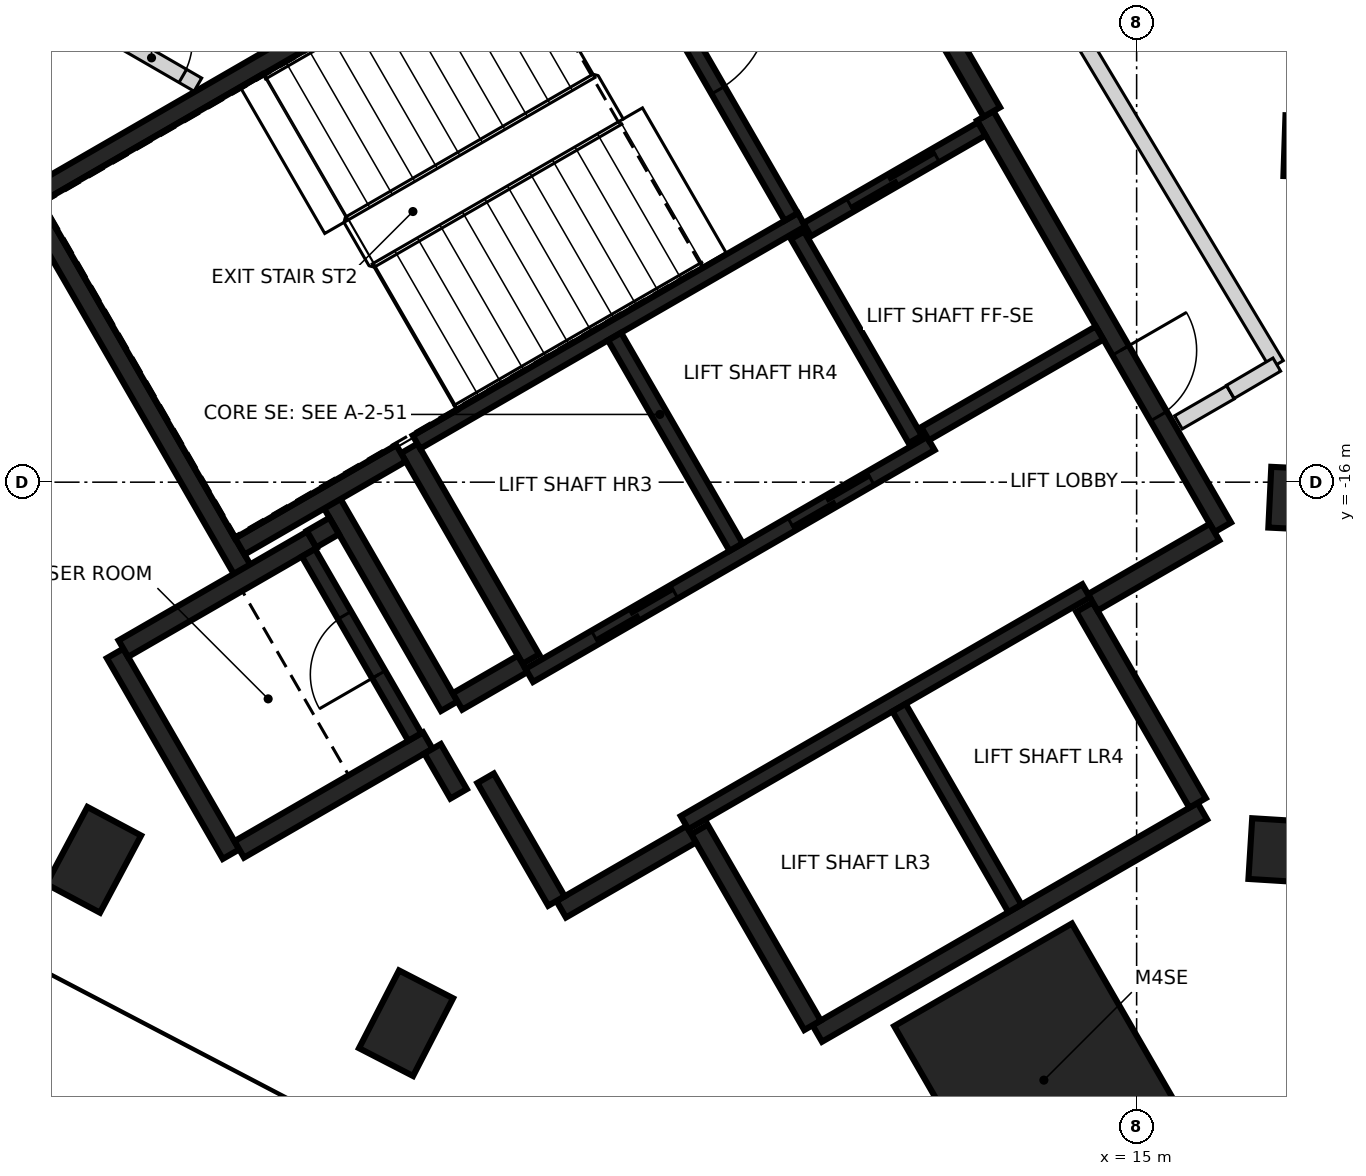
"""IFC4 building model, lengths in metres.
Left out: names, types, materials, properties, quantities, classifications, styles, units other than length and angle.
Written with IfcOpenShell. Run it as: python <this file> out.ifc"""

import sys

from ifc_helpers import new_model, si_unit, direction, frame, frame_2d, origin, origin_2d, place, context, subcontext, project, spatial, rectangle, extrude, element, fill, save


model = new_model("IFC4")
c1 = context("Model", 3, precision=1e-05, world=origin(), true_north=direction((0.0, 1.0)))
c2 = subcontext(c1, "Body", "Model", "MODEL_VIEW")
j1 = project(units=[si_unit("LENGTHUNIT", "METRE"), si_unit("PLANEANGLEUNIT", "RADIAN")], contexts=[c1])
p1 = place(None, origin())
s1 = spatial("IfcSite", under=j1, at=p1, CompositionType="ELEMENT")
p2 = place(p1, origin())
s2 = spatial("IfcBuilding", under=s1, at=p2, CompositionType="ELEMENT")
p3 = place(p2, frame((0.0, 0.0, 175.6)))
s3 = spatial("IfcBuildingStorey", under=s2, at=p3, CompositionType="ELEMENT", Elevation=175.6)
for number, where, z_axis, x_axis in (
    (1, (17.07, -20.856, -0.35), (0.0, 0.0, 1.0), (-0.998, 0.062, 0.0)),
    (2, (17.326, -16.226, -0.35), (0.0, 0.0, 1.0), (-0.999, 0.048, 0.0)),
    (3, (17.519, -11.592, -0.35), (0.0, 0.0, 1.0), (-0.999, 0.034, 0.0)),
    (4, (1.279, -20.968, -0.35), (0.0, 0.0, 1.0), (0.47, 0.883, 0.0)),
    (5, (5.388, -23.118, -0.35), (0.0, 0.0, 1.0), (0.458, 0.889, 0.0)),
):
    element("IfcColumn", number, at=place(p3, frame(where, z_axis=z_axis, x_axis=x_axis)), inside=s3, PredefinedType="COLUMN", context=c2, shape_type="SweptSolid", body=[
        extrude(rectangle(XDim=1.15, YDim=0.8, at=origin_2d()), origin(), (0.0, 0.0, 1.0), 3.6),
    ])
p4 = place(p3, frame((13.78, -23.867, -0.35), z_axis=(0.0, 0.0, 1.0), x_axis=(-0.5, 0.866025403784, 0.0)))
e6 = element("IfcColumn", 6, at=p4, inside=s3, PredefinedType="COLUMN", context=c2, shape_type="SweptSolid", body=[
    extrude(rectangle(XDim=3.2, YDim=2.7, at=origin_2d()), origin(), (0.0, 0.0, 1.0), 3.6),
])
p5 = place(p3, frame((0.417, -12.273, 0.0), z_axis=(0.0, 0.0, 1.0), x_axis=(0.866021906294, 0.500006057782, 0.0)))
e7 = element("IfcWall", 7, at=p5, inside=s3, PredefinedType="SHEAR", context=c2, shape_type="SweptSolid", body=[
    extrude(rectangle(XDim=11.55, YDim=0.25, at=frame_2d((5.775, 0.0))), origin(), (0.0, 0.0, 1.0), 3.25),
])
p6 = place(p5, frame((10.025, 0.0, 0.0)))
e8 = element("IfcOpeningElement", 8, at=p6, cuts=e7, PredefinedType="OPENING", context=c2, shape_type="SweptSolid", body=[
    extrude(rectangle(XDim=1.2, YDim=2.1, at=frame_2d((0.6, 1.05))), frame((0.0, 0.135, 0.0), z_axis=(0.0, -1.0, 0.0), x_axis=(1.0, 0.0, 0.0)), (0.0, 0.0, 1.0), 0.27),
])
p7 = place(p5, frame((8.725, 0.0, 0.0)))
e9 = element("IfcOpeningElement", 9, at=p7, cuts=e7, PredefinedType="OPENING", context=c2, shape_type="SweptSolid", body=[
    extrude(rectangle(XDim=1.2, YDim=2.1, at=frame_2d((0.6, 1.05))), frame((0.0, 0.135, 0.0), z_axis=(0.0, -1.0, 0.0), x_axis=(1.0, 0.0, 0.0)), (0.0, 0.0, 1.0), 0.27),
])
p8 = place(p3, frame((13.008, -11.181, 0.0), z_axis=(0.0, 0.0, 1.0), x_axis=(0.500004234368, -0.866022959057, 0.0)))
e10 = element("IfcWall", 10, at=p8, inside=s3, PredefinedType="SHEAR", context=c2, shape_type="SweptSolid", body=[
    extrude(rectangle(XDim=6.25, YDim=0.25, at=frame_2d((3.125, 0.0))), origin(), (0.0, 0.0, 1.0), 3.25),
])
p9 = place(p8, frame((3.563, 0.0, 0.0)))
e11 = element("IfcOpeningElement", 11, at=p9, cuts=e10, PredefinedType="OPENING", context=c2, shape_type="SweptSolid", body=[
    extrude(rectangle(XDim=1.0, YDim=2.1, at=frame_2d((0.5, 1.05))), frame((0.0, 0.135, 0.0), z_axis=(0.0, -1.0, 0.0), x_axis=(1.0, 0.0, 0.0)), (0.0, 0.0, 1.0), 0.27),
])
p10 = place(p3, frame((15.865, -20.328, 0.0), z_axis=(0.0, 0.0, 1.0), x_axis=(-0.86602852612, -0.499994591916, 0.0)))
e12 = element("IfcWall", 12, at=p10, inside=s3, PredefinedType="SHEAR", context=c2, shape_type="SweptSolid", body=[
    extrude(rectangle(XDim=5.85, YDim=0.25, at=frame_2d((2.925, 0.0))), origin(), (0.0, 0.0, 1.0), 3.25),
])
p11 = place(p3, frame((3.235, -17.153, 0.0), z_axis=(0.0, 0.0, 1.0), x_axis=(-0.500008851346, 0.866020293397, 0.0)))
e13 = element("IfcWall", 13, at=p11, inside=s3, PredefinedType="SHEAR", context=c2, shape_type="SweptSolid", body=[
    extrude(rectangle(XDim=5.51, YDim=0.25, at=frame_2d((2.755, 0.0))), origin(), (0.0, 0.0, 1.0), 3.25),
])
p12 = place(p3, frame((10.483, -6.606, 0.0), z_axis=(0.0, 0.0, 1.0), x_axis=(0.49999885962, -0.866026062182, 0.0)))
e14 = element("IfcWall", 14, at=p12, inside=s3, PredefinedType="SHEAR", context=c2, shape_type="SweptSolid", body=[
    extrude(rectangle(XDim=5.225, YDim=0.25, at=frame_2d((2.612, 0.0))), origin(), (0.0, 0.0, 1.0), 3.25),
])
p13 = place(p3, frame((7.031, -18.327, 0.0), z_axis=(0.0, 0.0, 1.0), x_axis=(-0.499971222258, 0.866042017984, 0.0)))
e15 = element("IfcWall", 15, at=p13, inside=s3, PredefinedType="SHEAR", context=c2, shape_type="SweptSolid", body=[
    extrude(rectangle(XDim=3.2, YDim=0.25, at=frame_2d((1.6, 0.0))), origin(), (0.0, 0.0, 1.0), 3.25),
])
for number, where, z_axis, x_axis in (
    (16, (14.315, -17.644, 0.0), (0.0, 0.0, 1.0), (0.5, -0.866, 0.0)),
    (17, (10.736, -23.145, 0.0), (0.0, 0.0, 1.0), (-0.5, 0.866, 0.0)),
):
    element("IfcWall", number, at=place(p3, frame(where, z_axis=z_axis, x_axis=x_axis)), inside=s3, PredefinedType="SHEAR", context=c2, shape_type="SweptSolid", body=[
        extrude(rectangle(XDim=2.974, YDim=0.25, at=frame_2d((1.487, 0.0))), origin(), (0.0, 0.0, 1.0), 3.25),
    ])
p14 = place(p3, frame((3.085, -20.894, 0.0), z_axis=(0.0, 0.0, 1.0), x_axis=(-0.499978833458, 0.866037623948, 0.0)))
e18 = element("IfcWall", 18, at=p14, inside=s3, PredefinedType="SHEAR", context=c2, shape_type="SweptSolid", body=[
    extrude(rectangle(XDim=3.05, YDim=0.25, at=frame_2d((1.525, 0.0))), origin(), (0.0, 0.0, 1.0), 3.25),
])
p15 = place(p3, frame((1.669, -18.19, 0.0), z_axis=(0.0, 0.0, 1.0), x_axis=(0.866042235819, 0.499970844928, 0.0)))
e19 = element("IfcWall", 19, at=p15, inside=s3, PredefinedType="SHEAR", context=c2, shape_type="SweptSolid", body=[
    extrude(rectangle(XDim=2.865, YDim=0.25, at=frame_2d((1.432, 0.0))), origin(), (0.0, 0.0, 1.0), 3.25),
])
p16 = place(p3, frame((5.675, -19.399, 0.0), z_axis=(0.0, 0.0, 1.0), x_axis=(-0.866026637627, -0.499997862916, 0.0)))
e20 = element("IfcWall", 20, at=p16, inside=s3, PredefinedType="SHEAR", context=c2, shape_type="SweptSolid", body=[
    extrude(rectangle(XDim=2.865, YDim=0.25, at=frame_2d((1.432, 0.0))), origin(), (0.0, 0.0, 1.0), 3.25),
])
p17 = place(p3, frame((4.414, -16.276, 0.0), z_axis=(0.0, 0.0, 1.0), x_axis=(0.500003324108, -0.866023484601, 0.0)))
e21 = element("IfcWall", 21, at=p17, inside=s3, PredefinedType="SHEAR", context=c2, shape_type="SweptSolid", body=[
    extrude(rectangle(XDim=3.085, YDim=0.25, at=frame_2d((1.542, 0.0))), origin(), (0.0, 0.0, 1.0), 3.25),
])
p18 = place(p3, frame((5.322, -15.619, 0.0), z_axis=(0.0, 0.0, 1.0), x_axis=(-0.866026229868, -0.499998569178, 0.0)))
e22 = element("IfcWall", 22, at=p18, inside=s3, PredefinedType="SHEAR", context=c2, shape_type="SweptSolid", body=[
    extrude(rectangle(XDim=2.449, YDim=0.25, at=frame_2d((1.225, 0.0))), origin(), (0.0, 0.0, 1.0), 3.25),
])
p19 = place(p3, frame((9.14, -20.631, 0.0), z_axis=(0.0, 0.0, 1.0), x_axis=(-0.866043531843, -0.499968599967, 0.0)))
e23 = element("IfcWall", 23, at=p19, inside=s3, PredefinedType="SHEAR", context=c2, shape_type="SweptSolid", body=[
    extrude(rectangle(XDim=1.975, YDim=0.25, at=frame_2d((0.987, 0.0))), origin(), (0.0, 0.0, 1.0), 3.25),
])
p20 = place(p3, frame((16.025, -16.656, 0.0), z_axis=(0.0, 0.0, 1.0), x_axis=(-0.866016279763, -0.500015802937, 0.0)))
e24 = element("IfcWall", 24, at=p20, inside=s3, PredefinedType="SHEAR", context=c2, shape_type="SweptSolid", body=[
    extrude(rectangle(XDim=1.849, YDim=0.25, at=frame_2d((0.925, 0.0))), origin(), (0.0, 0.0, 1.0), 3.25),
])
p21 = place(p3, frame((7.367, -21.51, 0.0), z_axis=(0.0, 0.0, 1.0), x_axis=(-0.499983108224, 0.866035156036, 0.0)))
e25 = element("IfcWall", 25, at=p21, inside=s3, PredefinedType="SHEAR", context=c2, shape_type="SweptSolid", body=[
    extrude(rectangle(XDim=1.865, YDim=0.25, at=frame_2d((0.932, 0.0))), origin(), (0.0, 0.0, 1.0), 3.25),
])
p22 = place(p3, frame((6.065, -18.885, 0.0), z_axis=(0.0, 0.0, 1.0), x_axis=(0.866017078145, 0.500014420154, 0.0)))
e26 = element("IfcWall", 26, at=p22, inside=s3, PredefinedType="SHEAR", context=c2, shape_type="SweptSolid", body=[
    extrude(rectangle(XDim=0.989, YDim=0.25, at=frame_2d((0.495, 0.0))), origin(), (0.0, 0.0, 1.0), 3.25),
])
p23 = place(p3, frame((6.08, -20.1, 0.0), z_axis=(0.0, 0.0, 1.0), x_axis=(-0.500051773299, 0.865995510393, 0.0)))
e27 = element("IfcWall", 27, at=p23, inside=s3, PredefinedType="SHEAR", context=c2, shape_type="SweptSolid", body=[
    extrude(rectangle(XDim=0.685, YDim=0.25, at=frame_2d((0.342, 0.0))), origin(), (0.0, 0.0, 1.0), 3.25),
])
p24 = place(p3, frame((4.145, -16.749, 0.0), z_axis=(0.0, 0.0, 1.0), x_axis=(0.866185586049, 0.49972245349, 0.0)))
e28 = element("IfcWall", 28, at=p24, inside=s3, PredefinedType="SHEAR", context=c2, shape_type="SweptSolid", body=[
    extrude(rectangle(XDim=0.344, YDim=0.25, at=frame_2d((0.172, 0.0))), origin(), (0.0, 0.0, 1.0), 3.25),
])
p25 = place(p3, frame((9.052, -20.48, 0.0), z_axis=(0.0, 0.0, 1.0), x_axis=(0.866030299012, 0.499991521122, 0.0)))
e29 = element("IfcWall", 29, at=p25, inside=s3, PredefinedType="SHEAR", context=c2, shape_type="SweptSolid", body=[
    extrude(rectangle(XDim=6.1, YDim=0.2, at=frame_2d((3.05, 0.0))), origin(), (0.0, 0.0, 1.0), 3.25),
])
p26 = place(p3, frame((5.526, -15.472, 0.0), z_axis=(0.0, 0.0, 1.0), x_axis=(0.866041752167, 0.499971682701, 0.0)))
e30 = element("IfcWall", 30, at=p26, inside=s3, PredefinedType="SHEAR", context=c2, shape_type="SweptSolid", body=[
    extrude(rectangle(XDim=5.851, YDim=0.2, at=frame_2d((2.925, 0.0))), origin(), (0.0, 0.0, 1.0), 3.25),
])
p27 = place(p3, frame((12.293, -15.491, 0.0), z_axis=(0.0, 0.0, 1.0), x_axis=(-0.866030299012, -0.499991521122, 0.0)))
e31 = element("IfcWall", 31, at=p27, inside=s3, PredefinedType="SHEAR", context=c2, shape_type="SweptSolid", body=[
    extrude(rectangle(XDim=6.1, YDim=0.2, at=frame_2d((3.05, 0.0))), origin(), (0.0, 0.0, 1.0), 3.25),
])
p28 = place(p27, frame((3.9, 0.0, 0.0)))
e32 = element("IfcOpeningElement", 32, at=p28, cuts=e31, PredefinedType="OPENING", context=c2, shape_type="SweptSolid", body=[
    extrude(rectangle(XDim=1.2, YDim=2.1, at=frame_2d((0.6, 1.05))), frame((0.0, 0.11, 0.0), z_axis=(0.0, -1.0, 0.0), x_axis=(1.0, 0.0, 0.0)), (0.0, 0.0, 1.0), 0.22),
])
p29 = place(p27, frame((0.918, 0.0, 0.0)))
e33 = element("IfcOpeningElement", 33, at=p29, cuts=e31, PredefinedType="OPENING", context=c2, shape_type="SweptSolid", body=[
    extrude(rectangle(XDim=1.2, YDim=2.1, at=frame_2d((0.6, 1.05))), frame((0.0, 0.11, 0.0), z_axis=(0.0, -1.0, 0.0), x_axis=(1.0, 0.0, 0.0)), (0.0, 0.0, 1.0), 0.22),
])
p30 = place(p3, frame((7.906, -8.094, 0.0), z_axis=(0.0, 0.0, 1.0), x_axis=(0.500027839223, -0.866009330205, 0.0)))
e34 = element("IfcWall", 34, at=p30, inside=s3, PredefinedType="SHEAR", context=c2, shape_type="SweptSolid", body=[
    extrude(rectangle(XDim=5.098, YDim=0.2, at=frame_2d((2.549, 0.0))), origin(), (0.0, 0.0, 1.0), 3.25),
])
p31 = place(p30, frame((1.774, 0.0, 0.0)))
e35 = element("IfcOpeningElement", 35, at=p31, cuts=e34, PredefinedType="OPENING", context=c2, shape_type="SweptSolid", body=[
    extrude(rectangle(XDim=1.4, YDim=2.1, at=frame_2d((0.7, 1.05))), frame((0.0, 0.11, 0.0), z_axis=(0.0, -1.0, 0.0), x_axis=(1.0, 0.0, 0.0)), (0.0, 0.0, 1.0), 0.22),
])
p32 = place(p3, frame((8.132, -14.084, 0.0), z_axis=(0.0, 0.0, 1.0), x_axis=(0.499997778408, -0.866026686418, 0.0)))
e36 = element("IfcWall", 36, at=p32, inside=s3, PredefinedType="SHEAR", context=c2, shape_type="SweptSolid", body=[
    extrude(rectangle(XDim=3.198, YDim=0.2, at=frame_2d((1.599, 0.0))), origin(), (0.0, 0.0, 1.0), 3.25),
])
p33 = place(p3, frame((11.875, -18.967, 0.0), z_axis=(0.0, 0.0, 1.0), x_axis=(0.49998131003, -0.866036194175, 0.0)))
e37 = element("IfcWall", 37, at=p33, inside=s3, PredefinedType="SHEAR", context=c2, shape_type="SweptSolid", body=[
    extrude(rectangle(XDim=3.048, YDim=0.2, at=frame_2d((1.524, 0.0))), origin(), (0.0, 0.0, 1.0), 3.25),
])
p34 = place(p3, frame((5.503, -19.352, 0.0), z_axis=(0.0, 0.0, 1.0), x_axis=(-0.499986818241, 0.866033014143, 0.0)))
e38 = element("IfcWall", 38, at=p34, inside=s3, PredefinedType="SHEAR", context=c2, shape_type="SweptSolid", body=[
    extrude(rectangle(XDim=2.798, YDim=0.2, at=frame_2d((1.399, 0.0))), origin(), (0.0, 0.0, 1.0), 3.25),
])
p35 = place(p34, frame((0.949, 0.0, 0.0)))
e39 = element("IfcOpeningElement", 39, at=p35, cuts=e38, PredefinedType="OPENING", context=c2, shape_type="SweptSolid", body=[
    extrude(rectangle(XDim=0.9, YDim=2.1, at=frame_2d((0.45, 1.05))), frame((0.0, 0.11, 0.0), z_axis=(0.0, -1.0, 0.0), x_axis=(1.0, 0.0, 0.0)), (0.0, 0.0, 1.0), 0.22),
])
p36 = place(p3, frame((12.088, -15.437, 0.0), z_axis=(0.0, 0.0, 1.0), x_axis=(-0.500026960575, 0.86600983753, 0.0)))
e40 = element("IfcWall", 40, at=p36, inside=s3, PredefinedType="SHEAR", context=c2, shape_type="SweptSolid", body=[
    extrude(rectangle(XDim=3.1, YDim=0.2, at=frame_2d((1.55, 0.0))), origin(), (0.0, 0.0, 1.0), 3.25),
])
p37 = place(p3, frame((10.666, -12.678, 0.0), z_axis=(0.0, 0.0, 1.0), x_axis=(0.866018407898, 0.500012117035, 0.0)))
e41 = element("IfcWall", 41, at=p37, inside=s3, PredefinedType="SHEAR", context=c2, shape_type="SweptSolid", body=[
    extrude(rectangle(XDim=2.651, YDim=0.2, at=frame_2d((1.325, 0.0))), origin(), (0.0, 0.0, 1.0), 3.25),
])
p38 = place(p37, frame((0.652, 0.0, 0.0)))
e42 = element("IfcOpeningElement", 42, at=p38, cuts=e41, PredefinedType="OPENING", context=c2, shape_type="SweptSolid", body=[
    extrude(rectangle(XDim=1.3, YDim=2.1, at=frame_2d((0.65, 1.05))), frame((0.0, 0.11, 0.0), z_axis=(0.0, -1.0, 0.0), x_axis=(1.0, 0.0, 0.0)), (0.0, 0.0, 1.0), 0.22),
])
p39 = place(p3, frame((14.512, -14.037, 0.0), z_axis=(0.0, 0.0, 1.0), x_axis=(-0.866018407898, -0.500012117035, 0.0)))
e43 = element("IfcWall", 43, at=p39, inside=s3, PredefinedType="SHEAR", context=c2, shape_type="SweptSolid", body=[
    extrude(rectangle(XDim=2.651, YDim=0.2, at=frame_2d((1.325, 0.0))), origin(), (0.0, 0.0, 1.0), 3.25),
])
p40 = place(p3, frame((-8.33, -4.428, 0.0), z_axis=(0.0, 0.0, 1.0), x_axis=(0.865923263811, -0.500176869909, 0.0)))
e44 = element("IfcWall", 44, at=p40, inside=s3, PredefinedType="PARTITIONING", context=c2, shape_type="SweptSolid", body=[
    extrude(rectangle(XDim=12.68, YDim=0.2, at=frame_2d((6.34, 0.0))), origin(), (0.0, 0.0, 1.0), 3.25),
])
p41 = place(p40, frame((2.87, 0.0, 0.0)))
e45 = element("IfcOpeningElement", 45, at=p41, cuts=e44, PredefinedType="OPENING", context=c2, shape_type="SweptSolid", body=[
    extrude(rectangle(XDim=0.95, YDim=2.1, at=frame_2d((0.475, 1.05))), frame((0.0, 0.11, 0.0), z_axis=(0.0, -1.0, 0.0), x_axis=(1.0, 0.0, 0.0)), (0.0, 0.0, 1.0), 0.22),
])
p42 = place(p40, frame((11.5, 0.0, 0.0)))
e46 = element("IfcOpeningElement", 46, at=p42, cuts=e44, PredefinedType="OPENING", context=c2, shape_type="SweptSolid", body=[
    extrude(rectangle(XDim=0.95, YDim=2.1, at=frame_2d((0.475, 1.05))), frame((0.0, 0.11, 0.0), z_axis=(0.0, -1.0, 0.0), x_axis=(1.0, 0.0, 0.0)), (0.0, 0.0, 1.0), 0.22),
])
p43 = place(p3, frame((11.216, -5.058, 0.0), z_axis=(0.0, 0.0, 1.0), x_axis=(0.51393500197, -0.857829128527, 0.0)))
e47 = element("IfcWall", 47, at=p43, inside=s3, PredefinedType="PARTITIONING", context=c2, shape_type="SweptSolid", body=[
    extrude(rectangle(XDim=10.951, YDim=0.2, at=frame_2d((5.475, 0.0))), origin(), (0.0, 0.0, 1.0), 3.25),
])
p44 = place(p43, frame((4.438, 0.0, 0.0)))
e48 = element("IfcOpeningElement", 48, at=p44, cuts=e47, PredefinedType="OPENING", context=c2, shape_type="SweptSolid", body=[
    extrude(rectangle(XDim=0.95, YDim=2.1, at=frame_2d((0.475, 1.05))), frame((0.0, 0.11, 0.0), z_axis=(0.0, -1.0, 0.0), x_axis=(1.0, 0.0, 0.0)), (0.0, 0.0, 1.0), 0.22),
])
p45 = place(p3, frame((15.55, -15.213, 0.0), z_axis=(0.0, 0.0, 1.0), x_axis=(0.865989998118, 0.500061319399, 0.0)))
e49 = element("IfcWall", 49, at=p45, inside=s3, PredefinedType="PARTITIONING", context=c2, shape_type="SweptSolid", body=[
    extrude(rectangle(XDim=0.79, YDim=0.2, at=frame_2d((0.395, 0.0))), origin(), (0.0, 0.0, 1.0), 3.25),
])
p46 = place(p3, frame((16.233, -14.812, 0.0), z_axis=(0.0, 0.0, 1.0), x_axis=(0.862137800155, 0.506673872964, 0.0)))
e50 = element("IfcWall", 50, at=p46, inside=s3, PredefinedType="PARTITIONING", context=c2, shape_type="SweptSolid", body=[
    extrude(rectangle(XDim=0.709, YDim=0.2, at=frame_2d((0.354, 0.0))), origin(), (0.0, 0.0, 1.0), 3.25),
])
p47 = place(p38, origin())
e51 = element("IfcDoor", 51, at=p47, inside=s3, OperationType="SLIDING_TO_LEFT", PredefinedType="DOOR", context=c2, shape_type="SweptSolid", body=[
    extrude(rectangle(XDim=1.3, YDim=2.1, at=frame_2d((0.65, 1.05))), frame((0.0, 0.025, 0.0), z_axis=(0.0, -1.0, 0.0), x_axis=(1.0, 0.0, 0.0)), (0.0, 0.0, 1.0), 0.05),
])
fill(e42, e51)
p48 = place(p28, origin())
e52 = element("IfcDoor", 52, at=p48, inside=s3, OperationType="DOUBLE_DOOR_SLIDING", PredefinedType="DOOR", context=c2, shape_type="SweptSolid", body=[
    extrude(rectangle(XDim=1.2, YDim=2.1, at=frame_2d((0.6, 1.05))), frame((0.0, 0.025, 0.0), z_axis=(0.0, -1.0, 0.0), x_axis=(1.0, 0.0, 0.0)), (0.0, 0.0, 1.0), 0.05),
])
fill(e32, e52)
p49 = place(p29, origin())
e53 = element("IfcDoor", 53, at=p49, inside=s3, OperationType="DOUBLE_DOOR_SLIDING", PredefinedType="DOOR", context=c2, shape_type="SweptSolid", body=[
    extrude(rectangle(XDim=1.2, YDim=2.1, at=frame_2d((0.6, 1.05))), frame((0.0, 0.025, 0.0), z_axis=(0.0, -1.0, 0.0), x_axis=(1.0, 0.0, 0.0)), (0.0, 0.0, 1.0), 0.05),
])
fill(e33, e53)
p50 = place(p9, origin())
e54 = element("IfcDoor", 54, at=p50, inside=s3, OperationType="SINGLE_SWING_LEFT", PredefinedType="DOOR", context=c2, shape_type="SweptSolid", body=[
    extrude(rectangle(XDim=1.0, YDim=2.1, at=frame_2d((0.5, 1.05))), frame((0.0, 0.025, 0.0), z_axis=(0.0, -1.0, 0.0), x_axis=(1.0, 0.0, 0.0)), (0.0, 0.0, 1.0), 0.05),
])
fill(e11, e54)
p51 = place(p31, origin())
e55 = element("IfcDoor", 55, at=p51, inside=s3, OperationType="SINGLE_SWING_LEFT", PredefinedType="DOOR", context=c2, shape_type="SweptSolid", body=[
    extrude(rectangle(XDim=1.4, YDim=2.1, at=frame_2d((0.7, 1.05))), frame((0.0, 0.025, 0.0), z_axis=(0.0, -1.0, 0.0), x_axis=(1.0, 0.0, 0.0)), (0.0, 0.0, 1.0), 0.05),
])
fill(e35, e55)
p52 = place(p35, origin())
e56 = element("IfcDoor", 56, at=p52, inside=s3, OperationType="SINGLE_SWING_RIGHT", PredefinedType="DOOR", context=c2, shape_type="SweptSolid", body=[
    extrude(rectangle(XDim=0.9, YDim=2.1, at=frame_2d((0.45, 1.05))), frame((0.0, 0.025, 0.0), z_axis=(0.0, -1.0, 0.0), x_axis=(1.0, 0.0, 0.0)), (0.0, 0.0, 1.0), 0.05),
])
fill(e39, e56)
p53 = place(p42, frame((0.95, 0.0, 0.0), z_axis=(0.0, 0.0, 1.0), x_axis=(-1.0, 0.0, 0.0)))
e57 = element("IfcDoor", 57, at=p53, inside=s3, OperationType="SINGLE_SWING_LEFT", PredefinedType="DOOR", context=c2, shape_type="SweptSolid", body=[
    extrude(rectangle(XDim=0.95, YDim=2.1, at=frame_2d((0.475, 1.05))), frame((0.0, 0.025, 0.0), z_axis=(0.0, -1.0, 0.0), x_axis=(1.0, 0.0, 0.0)), (0.0, 0.0, 1.0), 0.05),
])
fill(e46, e57)
save(model, sys.argv[1])
